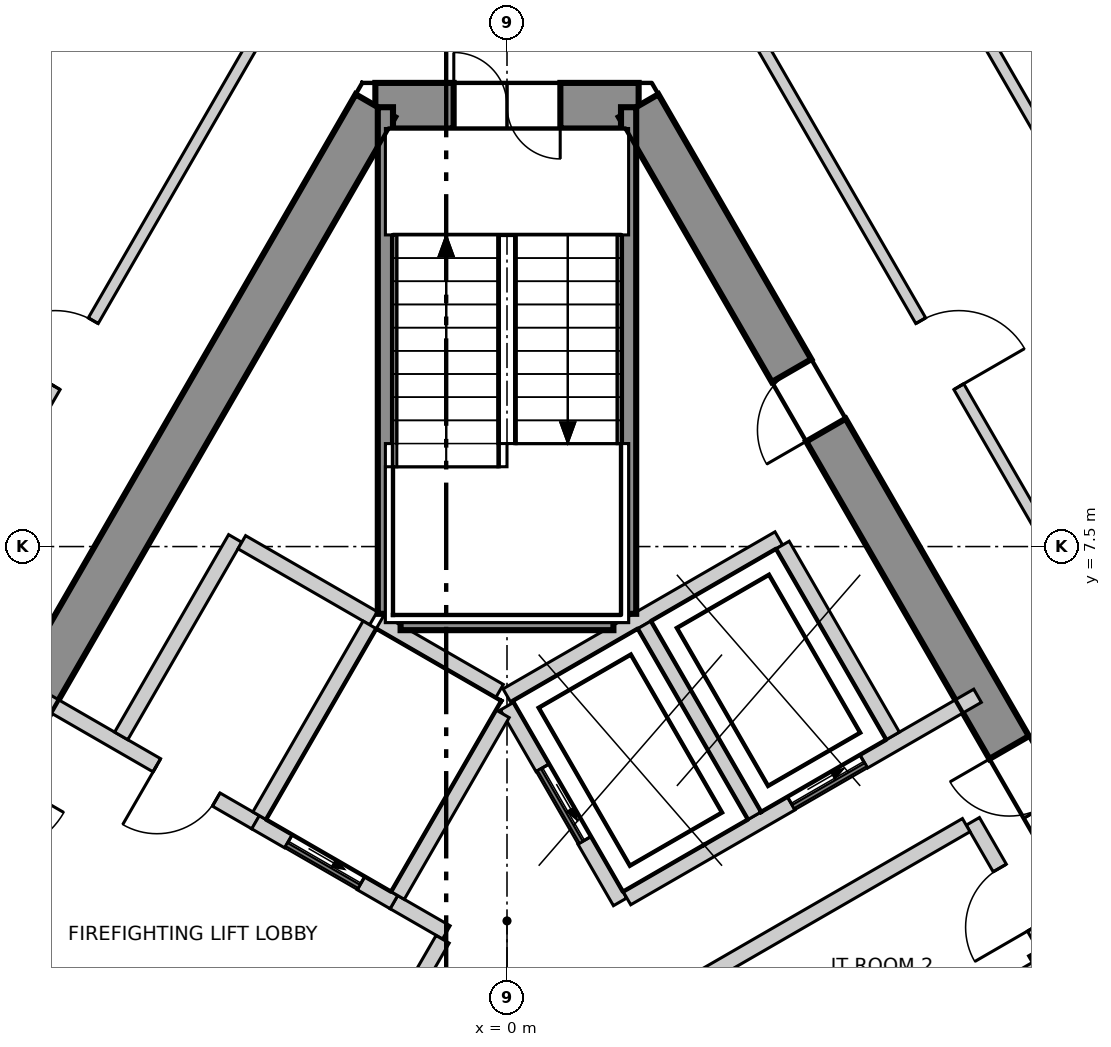
"""IFC4 building model, lengths in metres.
Left out: names, types, materials, properties, quantities, classifications, styles, units other than length and angle.
Written with IfcOpenShell. Run it as: python <this file> out.ifc"""

import sys

from ifc_helpers import new_model, si_unit, direction, frame, frame_2d, origin, place, context, subcontext, project, spatial, polyline, rectangle, outline, extrude, element, fill, save


model = new_model("IFC4")
c1 = context("Model", 3, precision=1e-05, world=origin(), true_north=direction((0.0, 1.0)))
c2 = subcontext(c1, "Body", "Model", "MODEL_VIEW")
j1 = project(units=[si_unit("LENGTHUNIT", "METRE"), si_unit("PLANEANGLEUNIT", "RADIAN")], contexts=[c1])
p1 = place(None, origin())
s1 = spatial("IfcSite", under=j1, at=p1, CompositionType="ELEMENT")
p2 = place(p1, origin())
s2 = spatial("IfcBuilding", under=s1, at=p2, CompositionType="ELEMENT")
p3 = place(p2, frame((0.0, 0.0, 261.8)))
s3 = spatial("IfcBuildingStorey", under=s2, at=p3, CompositionType="ELEMENT", Elevation=261.8)
p4 = place(p3, frame((1.732, 13.3, -0.3), z_axis=(0.0, 0.0, 1.0), x_axis=(-1.0, 0.0, 0.0)))
e1 = element("IfcWall", 1, at=p4, inside=s3, PredefinedType="SHEAR", context=c2, shape_type="SweptSolid", body=[
    extrude(outline(polyline([(-0.173, -0.3), (1.732, -0.3), (3.637, -0.3), (3.291, 0.3), (1.732, 0.3), (0.173, 0.3), (-0.173, -0.3)])), origin(), (0.0, 0.0, 1.0), 6.5),
])
p5 = place(p4, frame((1.032, 0.0, 0.3)))
e2 = element("IfcOpeningElement", 2, at=p5, cuts=e1, PredefinedType="OPENING", context=c2, shape_type="SweptSolid", body=[
    extrude(rectangle(XDim=1.4, YDim=2.1, at=frame_2d((0.7, 1.05))), frame((0.0, 0.31, 0.0), z_axis=(0.0, -1.0, 0.0), x_axis=(1.0, 0.0, 0.0)), (0.0, 0.0, 1.0), 0.62),
])
p6 = place(p3, frame((-1.732, 13.3, -0.3), z_axis=(0.0, 0.0, 1.0), x_axis=(-0.500000539815, -0.866025092122, 0.0)))
e3 = element("IfcWall", 3, at=p6, inside=s3, PredefinedType="SHEAR", context=c2, shape_type="SweptSolid", body=[
    extrude(outline(polyline([(-0.173, -0.3), (1.795, -0.3), (3.763, -0.3), (5.732, -0.3), (7.7, -0.3), (9.668, -0.301), (11.637, -0.301), (13.605, -0.301), (15.573, -0.301), (17.542, -0.301), (19.51, -0.301), (21.478, -0.301), (21.131, 0.3), (19.226, 0.3), (17.321, 0.3), (15.415, 0.3), (13.51, 0.3), (11.605, 0.3), (9.699, 0.3), (7.794, 0.3), (5.889, 0.3), (3.984, 0.3), (2.078, 0.3), (0.173, 0.3), (-0.173, -0.3)])), origin(), (0.0, 0.0, 1.0), 6.5),
])
p7 = place(p6, frame((10.102, 0.0, 0.3)))
e4 = element("IfcOpeningElement", 4, at=p7, cuts=e3, PredefinedType="OPENING", context=c2, shape_type="SweptSolid", body=[
    extrude(rectangle(XDim=1.1, YDim=2.1, at=frame_2d((0.55, 1.05))), frame((0.0, 0.31, 0.0), z_axis=(0.0, -1.0, 0.0), x_axis=(1.0, 0.0, 0.0)), (0.0, 0.0, 1.0), 0.621),
])
p8 = place(p6, frame((16.248, 0.0, 0.3)))
e5 = element("IfcOpeningElement", 5, at=p8, cuts=e3, PredefinedType="OPENING", context=c2, shape_type="SweptSolid", body=[
    extrude(rectangle(XDim=0.9, YDim=2.1, at=frame_2d((0.45, 1.05))), frame((0.0, 0.31, 0.0), z_axis=(0.0, -1.0, 0.0), x_axis=(1.0, 0.0, 0.0)), (0.0, 0.0, 1.0), 0.621),
])
p9 = place(p3, frame((12.384, -5.15, -0.3), z_axis=(0.0, 0.0, 1.0), x_axis=(-0.500000539815, 0.866025092122, 0.0)))
e6 = element("IfcWall", 6, at=p9, inside=s3, PredefinedType="SHEAR", context=c2, shape_type="SweptSolid", body=[
    extrude(outline(polyline([(-0.173, -0.301), (1.795, -0.301), (3.763, -0.301), (5.731, -0.301), (7.7, -0.301), (9.668, -0.301), (11.636, -0.301), (13.604, -0.3), (15.573, -0.3), (17.541, -0.3), (19.509, -0.3), (21.477, -0.3), (21.131, 0.3), (19.226, 0.3), (17.321, 0.3), (15.415, 0.3), (13.51, 0.3), (11.605, 0.3), (9.699, 0.3), (7.794, 0.3), (5.889, 0.3), (3.984, 0.3), (2.078, 0.3), (0.173, 0.3), (-0.173, -0.301)])), origin(), (0.0, 0.0, 1.0), 6.5),
])
p10 = place(p9, frame((9.752, 0.0, 0.3)))
e7 = element("IfcOpeningElement", 7, at=p10, cuts=e6, PredefinedType="OPENING", context=c2, shape_type="SweptSolid", body=[
    extrude(rectangle(XDim=1.8, YDim=2.1, at=frame_2d((0.9, 1.05))), frame((0.0, 0.31, 0.0), z_axis=(0.0, -1.0, 0.0), x_axis=(1.0, 0.0, 0.0)), (0.0, 0.0, 1.0), 0.621),
])
p11 = place(p9, frame((16.378, 0.0, 0.3)))
e8 = element("IfcOpeningElement", 8, at=p11, cuts=e6, PredefinedType="OPENING", context=c2, shape_type="SweptSolid", body=[
    extrude(rectangle(XDim=0.9, YDim=2.1, at=frame_2d((0.45, 1.05))), frame((0.0, 0.31, 0.0), z_axis=(0.0, -1.0, 0.0), x_axis=(1.0, 0.0, 0.0)), (0.0, 0.0, 1.0), 0.621),
])
p12 = place(p3, frame((2.689, 25.293, 0.0), z_axis=(0.0, 0.0, 1.0), x_axis=(0.500022309378, -0.866012523076, 0.0)))
e9 = element("IfcWall", 9, at=p12, inside=s3, PredefinedType="PARTITIONING", context=c2, shape_type="SweptSolid", body=[
    extrude(rectangle(XDim=41.206, YDim=0.15, at=frame_2d((20.603, 0.0))), origin(), (0.0, 0.0, 1.0), 6.2),
])
p13 = place(p3, frame((2.771, 15.1, 0.0), z_axis=(0.0, 0.0, 1.0), x_axis=(0.500017691629, -0.866015189277, 0.0)))
e10 = element("IfcWall", 10, at=p13, inside=s3, PredefinedType="PARTITIONING", context=c2, shape_type="SweptSolid", body=[
    extrude(rectangle(XDim=23.383, YDim=0.15, at=frame_2d((11.691, 0.0))), origin(), (0.0, 0.0, 1.0), 6.2),
])
p14 = place(p13, frame((17.037, 0.0, 0.0)))
e11 = element("IfcOpeningElement", 11, at=p14, cuts=e10, PredefinedType="OPENING", context=c2, shape_type="SweptSolid", body=[
    extrude(rectangle(XDim=1.0, YDim=2.1, at=frame_2d((0.5, 1.05))), frame((0.0, 0.085, 0.0), z_axis=(0.0, -1.0, 0.0), x_axis=(1.0, 0.0, 0.0)), (0.0, 0.0, 1.0), 0.17),
])
p15 = place(p13, frame((5.346, 0.0, 0.0)))
e12 = element("IfcOpeningElement", 12, at=p15, cuts=e10, PredefinedType="OPENING", context=c2, shape_type="SweptSolid", body=[
    extrude(rectangle(XDim=1.0, YDim=2.1, at=frame_2d((0.5, 1.05))), frame((0.0, 0.085, 0.0), z_axis=(0.0, -1.0, 0.0), x_axis=(1.0, 0.0, 0.0)), (0.0, 0.0, 1.0), 0.17),
])
p16 = place(p3, frame((2.166, 21.349, 0.0), z_axis=(0.0, 0.0, 1.0), x_axis=(0.499984980739, -0.866034074985, 0.0)))
e13 = element("IfcWall", 13, at=p16, inside=s3, PredefinedType="PARTITIONING", context=c2, shape_type="SweptSolid", body=[
    extrude(rectangle(XDim=34.991, YDim=0.15, at=frame_2d((17.495, 0.0))), origin(), (0.0, 0.0, 1.0), 6.2),
])
p17 = place(p3, frame((-14.463, -5.15, 0.0), z_axis=(0.0, 0.0, 1.0), x_axis=(0.500017691629, 0.866015189277, 0.0)))
e14 = element("IfcWall", 14, at=p17, inside=s3, PredefinedType="PARTITIONING", context=c2, shape_type="SweptSolid", body=[
    extrude(rectangle(XDim=23.383, YDim=0.15, at=frame_2d((11.691, 0.0))), origin(), (0.0, 0.0, 1.0), 6.2),
])
p18 = place(p17, frame((17.037, 0.0, 0.0)))
e15 = element("IfcOpeningElement", 15, at=p18, cuts=e14, PredefinedType="OPENING", context=c2, shape_type="SweptSolid", body=[
    extrude(rectangle(XDim=1.0, YDim=2.1, at=frame_2d((0.5, 1.05))), frame((0.0, 0.085, 0.0), z_axis=(0.0, -1.0, 0.0), x_axis=(1.0, 0.0, 0.0)), (0.0, 0.0, 1.0), 0.17),
])
p19 = place(p17, frame((5.346, 0.0, 0.0)))
e16 = element("IfcOpeningElement", 16, at=p19, cuts=e14, PredefinedType="OPENING", context=c2, shape_type="SweptSolid", body=[
    extrude(rectangle(XDim=1.0, YDim=2.1, at=frame_2d((0.5, 1.05))), frame((0.0, 0.085, 0.0), z_axis=(0.0, -1.0, 0.0), x_axis=(1.0, 0.0, 0.0)), (0.0, 0.0, 1.0), 0.17),
])
p20 = place(p3, frame((-19.571, -8.798, 0.0), z_axis=(0.0, 0.0, 1.0), x_axis=(0.500014166641, 0.866017224516, 0.0)))
e17 = element("IfcWall", 17, at=p20, inside=s3, PredefinedType="PARTITIONING", context=c2, shape_type="SweptSolid", body=[
    extrude(rectangle(XDim=34.991, YDim=0.15, at=frame_2d((17.496, 0.0))), origin(), (0.0, 0.0, 1.0), 6.2),
])
p21 = place(p3, frame((-23.25, -10.317, 0.0), z_axis=(0.0, 0.0, 1.0), x_axis=(0.500024875003, 0.866011041719, 0.0)))
e18 = element("IfcWall", 18, at=p21, inside=s3, PredefinedType="PARTITIONING", context=c2, shape_type="SweptSolid", body=[
    extrude(rectangle(XDim=41.206, YDim=0.15, at=frame_2d((20.603, 0.0))), origin(), (0.0, 0.0, 1.0), 6.2),
])
p22 = place(p3, frame((-0.002, 5.541, 0.0), z_axis=(0.0, 0.0, 1.0), x_axis=(0.86600155993, 0.500041296494, 0.0)))
e19 = element("IfcWall", 19, at=p22, inside=s3, PredefinedType="SOLIDWALL", context=c2, shape_type="SweptSolid", body=[
    extrude(rectangle(XDim=4.132, YDim=0.2, at=frame_2d((2.066, 0.0))), origin(), (0.0, 0.0, 1.0), 6.2),
])
p23 = place(p3, frame((0.0, 5.4, 0.0), z_axis=(0.0, 0.0, 1.0), x_axis=(0.500103862429, -0.865965430478, 0.0)))
e20 = element("IfcWall", 20, at=p23, inside=s3, PredefinedType="SOLIDWALL", context=c2, shape_type="SweptSolid", body=[
    extrude(rectangle(XDim=2.973, YDim=0.2, at=frame_2d((1.487, 0.0))), origin(), (0.0, 0.0, 1.0), 6.2),
])
p24 = place(p23, frame((0.937, 0.0, 0.0)))
e21 = element("IfcOpeningElement", 21, at=p24, cuts=e20, PredefinedType="OPENING", context=c2, shape_type="SweptSolid", body=[
    extrude(rectangle(XDim=1.1, YDim=2.1, at=frame_2d((0.55, 1.05))), frame((0.0, 0.11, 0.0), z_axis=(0.0, -1.0, 0.0), x_axis=(1.0, 0.0, 0.0)), (0.0, 0.0, 1.0), 0.22),
])
p25 = place(p3, frame((1.578, 2.874, 0.0), z_axis=(0.0, 0.0, 1.0), x_axis=(0.866045911672, 0.499964477614, 0.0)))
e22 = element("IfcWall", 22, at=p25, inside=s3, PredefinedType="SOLIDWALL", context=c2, shape_type="SweptSolid", body=[
    extrude(rectangle(XDim=5.327, YDim=0.2, at=frame_2d((2.663, 0.0))), origin(), (0.0, 0.0, 1.0), 6.2),
])
p26 = place(p25, frame((2.496, 0.0, 0.0)))
e23 = element("IfcOpeningElement", 23, at=p26, cuts=e22, PredefinedType="OPENING", context=c2, shape_type="SweptSolid", body=[
    extrude(rectangle(XDim=1.1, YDim=2.1, at=frame_2d((0.55, 1.05))), frame((0.0, 0.11, 0.0), z_axis=(0.0, -1.0, 0.0), x_axis=(1.0, 0.0, 0.0)), (0.0, 0.0, 1.0), 0.22),
])
for number, where, z_axis, x_axis in (
    (24, (3.626, 7.52, 0.0), (0.0, 0.0, 1.0), (0.5, -0.866, 0.0)),
    (25, (1.807, 6.47, 0.0), (0.0, 0.0, 1.0), (0.5, -0.866, 0.0)),
):
    element("IfcWall", number, at=place(p3, frame(where, z_axis=z_axis, x_axis=x_axis)), inside=s3, PredefinedType="SOLIDWALL", context=c2, shape_type="SweptSolid", body=[
        extrude(rectangle(XDim=2.9, YDim=0.2, at=frame_2d((1.45, 0.0))), origin(), (0.0, 0.0, 1.0), 6.2),
    ])
p27 = place(p3, frame((6.129, 3.885, 0.0), z_axis=(0.0, 0.0, 1.0), x_axis=(0.499952260202, -0.866052964615, 0.0)))
e26 = element("IfcWall", 26, at=p27, inside=s3, PredefinedType="SOLIDWALL", context=c2, shape_type="SweptSolid", body=[
    extrude(rectangle(XDim=1.901, YDim=0.2, at=frame_2d((0.95, 0.0))), origin(), (0.0, 0.0, 1.0), 6.2),
])
p28 = place(p27, frame((0.71, 0.0, 0.0)))
e27 = element("IfcOpeningElement", 27, at=p28, cuts=e26, PredefinedType="OPENING", context=c2, shape_type="SweptSolid", body=[
    extrude(rectangle(XDim=0.9, YDim=2.1, at=frame_2d((0.45, 1.05))), frame((0.0, 0.11, 0.0), z_axis=(0.0, -1.0, 0.0), x_axis=(1.0, 0.0, 0.0)), (0.0, 0.0, 1.0), 0.22),
])
p29 = place(p3, frame((2.275, 1.66, 0.0), z_axis=(0.0, 0.0, 1.0), x_axis=(0.866013608182, 0.500020430026, 0.0)))
e28 = element("IfcWall", 28, at=p29, inside=s3, PredefinedType="SOLIDWALL", context=c2, shape_type="SweptSolid", body=[
    extrude(rectangle(XDim=4.35, YDim=0.2, at=frame_2d((2.175, 0.0))), origin(), (0.0, 0.0, 1.0), 6.2),
])
p30 = place(p3, frame((-7.891, 2.593, 0.0), z_axis=(0.0, 0.0, 1.0), x_axis=(0.866070917804, -0.499921159118, 0.0)))
e29 = element("IfcWall", 29, at=p30, inside=s3, PredefinedType="SOLIDWALL", context=c2, shape_type="SweptSolid", body=[
    extrude(rectangle(XDim=3.333, YDim=0.2, at=frame_2d((1.666, 0.0))), origin(), (0.0, 0.0, 1.0), 6.2),
])
p31 = place(p30, frame((1.73, 0.0, 0.0)))
e30 = element("IfcOpeningElement", 30, at=p31, cuts=e29, PredefinedType="OPENING", context=c2, shape_type="SweptSolid", body=[
    extrude(rectangle(XDim=1.1, YDim=2.1, at=frame_2d((0.55, 1.05))), frame((0.0, 0.11, 0.0), z_axis=(0.0, -1.0, 0.0), x_axis=(1.0, 0.0, 0.0)), (0.0, 0.0, 1.0), 0.22),
])
p32 = place(p3, frame((-6.191, 5.537, 0.0), z_axis=(0.0, 0.0, 1.0), x_axis=(0.866052607023, -0.499952879648, 0.0)))
e31 = element("IfcWall", 31, at=p32, inside=s3, PredefinedType="SOLIDWALL", context=c2, shape_type="SweptSolid", body=[
    extrude(rectangle(XDim=3.332, YDim=0.2, at=frame_2d((1.666, 0.0))), origin(), (0.0, 0.0, 1.0), 6.2),
])
p33 = place(p32, frame((1.83, 0.0, 0.0)))
e32 = element("IfcOpeningElement", 32, at=p33, cuts=e31, PredefinedType="OPENING", context=c2, shape_type="SweptSolid", body=[
    extrude(rectangle(XDim=0.9, YDim=2.1, at=frame_2d((0.45, 1.05))), frame((0.0, 0.11, 0.0), z_axis=(0.0, -1.0, 0.0), x_axis=(1.0, 0.0, 0.0)), (0.0, 0.0, 1.0), 0.22),
])
p34 = place(p3, frame((-1.488, 2.822, 0.0), z_axis=(0.0, 0.0, 1.0), x_axis=(0.866236612152, -0.499633997809, 0.0)))
e33 = element("IfcWall", 33, at=p34, inside=s3, PredefinedType="SOLIDWALL", context=c2, shape_type="SweptSolid", body=[
    extrude(rectangle(XDim=0.796, YDim=0.2, at=frame_2d((0.398, 0.0))), origin(), (0.0, 0.0, 1.0), 6.2),
])
p35 = place(p3, frame((-5.076, 5.009, 0.0), z_axis=(0.0, 0.0, 1.0), x_axis=(0.50002537861, 0.866010750942, 0.0)))
e34 = element("IfcWall", 34, at=p35, inside=s3, PredefinedType="SOLIDWALL", context=c2, shape_type="SweptSolid", body=[
    extrude(rectangle(XDim=3.0, YDim=0.2, at=frame_2d((1.5, 0.0))), origin(), (0.0, 0.0, 1.0), 6.2),
])
p36 = place(p3, frame((-3.489, 7.557, 0.0), z_axis=(0.0, 0.0, 1.0), x_axis=(0.866010750942, -0.50002537861, 0.0)))
e35 = element("IfcWall", 35, at=p36, inside=s3, PredefinedType="SOLIDWALL", context=c2, shape_type="SweptSolid", body=[
    extrude(rectangle(XDim=2.0, YDim=0.2, at=frame_2d((1.0, 0.0))), origin(), (0.0, 0.0, 1.0), 6.2),
])
p37 = place(p3, frame((-2.444, -0.433, 0.0), z_axis=(0.0, 0.0, 1.0), x_axis=(0.500035624827, 0.866004834804, 0.0)))
e36 = element("IfcWall", 36, at=p37, inside=s3, PredefinedType="SOLIDWALL", context=c2, shape_type="SweptSolid", body=[
    extrude(rectangle(XDim=3.194, YDim=0.2, at=frame_2d((1.597, 0.0))), origin(), (0.0, 0.0, 1.0), 6.2),
])
p38 = place(p3, frame((-3.309, 3.873, 0.0), z_axis=(0.0, 0.0, 1.0), x_axis=(0.866098583652, -0.499873227325, 0.0)))
e37 = element("IfcWall", 37, at=p38, inside=s3, PredefinedType="SOLIDWALL", context=c2, shape_type="SweptSolid", body=[
    extrude(rectangle(XDim=2.103, YDim=0.2, at=frame_2d((1.051, 0.0))), origin(), (0.0, 0.0, 1.0), 6.2),
])
p39 = place(p38, frame((0.502, 0.0, 0.0)))
e38 = element("IfcOpeningElement", 38, at=p39, cuts=e37, PredefinedType="OPENING", context=c2, shape_type="SweptSolid", body=[
    extrude(rectangle(XDim=1.1, YDim=2.1, at=frame_2d((0.55, 1.05))), frame((0.0, 0.11, 0.0), z_axis=(0.0, -1.0, 0.0), x_axis=(1.0, 0.0, 0.0)), (0.0, 0.0, 1.0), 0.22),
])
p40 = place(p3, frame((-3.257, 3.959, 0.0), z_axis=(0.0, 0.0, 1.0), x_axis=(0.50012328804, 0.865954211699, 0.0)))
e39 = element("IfcWall", 39, at=p40, inside=s3, PredefinedType="SOLIDWALL", context=c2, shape_type="SweptSolid", body=[
    extrude(rectangle(XDim=2.9, YDim=0.2, at=frame_2d((1.45, 0.0))), origin(), (0.0, 0.0, 1.0), 6.2),
])
p41 = place(p3, frame((-1.67, 6.507, 0.0), z_axis=(0.0, 0.0, 1.0), x_axis=(0.865941441609, -0.500145398563, 0.0)))
e40 = element("IfcWall", 40, at=p41, inside=s3, PredefinedType="SOLIDWALL", context=c2, shape_type="SweptSolid", body=[
    extrude(rectangle(XDim=1.815, YDim=0.2, at=frame_2d((0.908, 0.0))), origin(), (0.0, 0.0, 1.0), 6.2),
])
p42 = place(p3, frame((-1.438, 2.909, 0.0), z_axis=(0.0, 0.0, 1.0), x_axis=(0.499829630636, 0.866123744241, 0.0)))
e41 = element("IfcWall", 41, at=p42, inside=s3, PredefinedType="SOLIDWALL", context=c2, shape_type="SweptSolid", body=[
    extrude(rectangle(XDim=2.761, YDim=0.2, at=frame_2d((1.38, 0.0))), origin(), (0.0, 0.0, 1.0), 6.2),
])
p43 = place(p3, frame((6.826, 1.978, 0.0), z_axis=(0.0, 0.0, 1.0), x_axis=(0.499990139034, -0.866031096941, 0.0)))
e42 = element("IfcWall", 42, at=p43, inside=s3, PredefinedType="SOLIDWALL", context=c2, shape_type="SweptSolid", body=[
    extrude(rectangle(XDim=3.0, YDim=0.2, at=frame_2d((1.5, 0.0))), origin(), (0.0, 0.0, 1.0), 6.2),
])
p44 = place(p3, frame((6.912, 2.028, 0.0), z_axis=(0.0, 0.0, 1.0), x_axis=(0.866559367082, 0.499074005857, 0.0)))
e43 = element("IfcWall", 43, at=p44, inside=s3, PredefinedType="SOLIDWALL", context=c2, shape_type="SweptSolid", body=[
    extrude(rectangle(XDim=0.152, YDim=0.2, at=frame_2d((0.076, 0.0))), origin(), (0.0, 0.0, 1.0), 6.2),
])
p45 = place(p3, frame((1.6, 6.615, 0.0), z_axis=(0.0, 0.0, 1.0), x_axis=(0.0, 1.0, 0.0)))
e44 = element("IfcWall", 44, at=p45, inside=s3, PredefinedType="SOLIDWALL", context=c2, shape_type="SweptSolid", body=[
    extrude(rectangle(XDim=6.665, YDim=0.2, at=frame_2d((3.333, 0.0))), origin(), (0.0, 0.0, 1.0), 6.2),
])
p46 = place(p3, frame((-1.4, 6.5, 0.0), z_axis=(0.0, 0.0, 1.0), x_axis=(1.0, 0.0, 0.0)))
e45 = element("IfcWall", 45, at=p46, inside=s3, PredefinedType="SOLIDWALL", context=c2, shape_type="SweptSolid", body=[
    extrude(rectangle(XDim=2.8, YDim=0.2, at=frame_2d((1.4, 0.0))), origin(), (0.0, 0.0, 1.0), 6.2),
])
p47 = place(p3, frame((-1.6, 6.615, 0.0), z_axis=(0.0, 0.0, 1.0), x_axis=(0.0, 1.0, 0.0)))
e46 = element("IfcWall", 46, at=p47, inside=s3, PredefinedType="SOLIDWALL", context=c2, shape_type="SweptSolid", body=[
    extrude(rectangle(XDim=6.665, YDim=0.2, at=frame_2d((3.333, 0.0))), origin(), (0.0, 0.0, 1.0), 6.2),
])
p48 = place(p24, origin())
e47 = element("IfcDoor", 47, at=p48, inside=s3, OperationType="SLIDING_TO_LEFT", PredefinedType="DOOR", context=c2, shape_type="SweptSolid", body=[
    extrude(rectangle(XDim=1.1, YDim=2.1, at=frame_2d((0.55, 1.05))), frame((0.0, 0.025, 0.0), z_axis=(0.0, -1.0, 0.0), x_axis=(1.0, 0.0, 0.0)), (0.0, 0.0, 1.0), 0.05),
])
fill(e21, e47)
p49 = place(p26, origin())
e48 = element("IfcDoor", 48, at=p49, inside=s3, OperationType="SLIDING_TO_LEFT", PredefinedType="DOOR", context=c2, shape_type="SweptSolid", body=[
    extrude(rectangle(XDim=1.1, YDim=2.1, at=frame_2d((0.55, 1.05))), frame((0.0, 0.025, 0.0), z_axis=(0.0, -1.0, 0.0), x_axis=(1.0, 0.0, 0.0)), (0.0, 0.0, 1.0), 0.05),
])
fill(e23, e48)
p50 = place(p39, origin())
e49 = element("IfcDoor", 49, at=p50, inside=s3, OperationType="SLIDING_TO_LEFT", PredefinedType="DOOR", context=c2, shape_type="SweptSolid", body=[
    extrude(rectangle(XDim=1.1, YDim=2.1, at=frame_2d((0.55, 1.05))), frame((0.0, 0.025, 0.0), z_axis=(0.0, -1.0, 0.0), x_axis=(1.0, 0.0, 0.0)), (0.0, 0.0, 1.0), 0.05),
])
fill(e38, e49)
p51 = place(p33, origin())
e50 = element("IfcDoor", 50, at=p51, inside=s3, OperationType="SINGLE_SWING_LEFT", PredefinedType="DOOR", context=c2, shape_type="SweptSolid", body=[
    extrude(rectangle(XDim=0.9, YDim=2.1, at=frame_2d((0.45, 1.05))), frame((0.0, 0.025, 0.0), z_axis=(0.0, -1.0, 0.0), x_axis=(1.0, 0.0, 0.0)), (0.0, 0.0, 1.0), 0.05),
])
fill(e32, e50)
p52 = place(p15, origin())
e51 = element("IfcDoor", 51, at=p52, inside=s3, OperationType="SINGLE_SWING_LEFT", PredefinedType="DOOR", context=c2, shape_type="SweptSolid", body=[
    extrude(rectangle(XDim=1.0, YDim=2.1, at=frame_2d((0.5, 1.05))), frame((0.0, 0.025, 0.0), z_axis=(0.0, -1.0, 0.0), x_axis=(1.0, 0.0, 0.0)), (0.0, 0.0, 1.0), 0.05),
])
fill(e12, e51)
p53 = place(p18, origin())
e52 = element("IfcDoor", 52, at=p53, inside=s3, OperationType="SINGLE_SWING_RIGHT", PredefinedType="DOOR", context=c2, shape_type="SweptSolid", body=[
    extrude(rectangle(XDim=1.0, YDim=2.1, at=frame_2d((0.5, 1.05))), frame((0.0, 0.025, 0.0), z_axis=(0.0, -1.0, 0.0), x_axis=(1.0, 0.0, 0.0)), (0.0, 0.0, 1.0), 0.05),
])
fill(e15, e52)
p54 = place(p10, origin())
e53 = element("IfcDoor", 53, at=p54, inside=s3, OperationType="DOUBLE_DOOR_SINGLE_SWING", PredefinedType="DOOR", context=c2, shape_type="SweptSolid", body=[
    extrude(rectangle(XDim=1.8, YDim=2.1, at=frame_2d((0.9, 1.05))), frame((0.0, 0.025, 0.0), z_axis=(0.0, -1.0, 0.0), x_axis=(1.0, 0.0, 0.0)), (0.0, 0.0, 1.0), 0.05),
])
fill(e7, e53)
p55 = place(p5, origin())
e54 = element("IfcDoor", 54, at=p55, inside=s3, OperationType="DOUBLE_DOOR_SINGLE_SWING", PredefinedType="DOOR", context=c2, shape_type="SweptSolid", body=[
    extrude(rectangle(XDim=1.4, YDim=2.1, at=frame_2d((0.7, 1.05))), frame((0.0, 0.025, 0.0), z_axis=(0.0, -1.0, 0.0), x_axis=(1.0, 0.0, 0.0)), (0.0, 0.0, 1.0), 0.05),
])
fill(e2, e54)
p56 = place(p11, origin())
e55 = element("IfcDoor", 55, at=p56, inside=s3, OperationType="SINGLE_SWING_RIGHT", PredefinedType="DOOR", context=c2, shape_type="SweptSolid", body=[
    extrude(rectangle(XDim=0.9, YDim=2.1, at=frame_2d((0.45, 1.05))), frame((0.0, 0.025, 0.0), z_axis=(0.0, -1.0, 0.0), x_axis=(1.0, 0.0, 0.0)), (0.0, 0.0, 1.0), 0.05),
])
fill(e8, e55)
p57 = place(p28, origin())
e56 = element("IfcDoor", 56, at=p57, inside=s3, OperationType="SINGLE_SWING_RIGHT", PredefinedType="DOOR", context=c2, shape_type="SweptSolid", body=[
    extrude(rectangle(XDim=0.9, YDim=2.1, at=frame_2d((0.45, 1.05))), frame((0.0, 0.025, 0.0), z_axis=(0.0, -1.0, 0.0), x_axis=(1.0, 0.0, 0.0)), (0.0, 0.0, 1.0), 0.05),
])
fill(e27, e56)
save(model, sys.argv[1])
